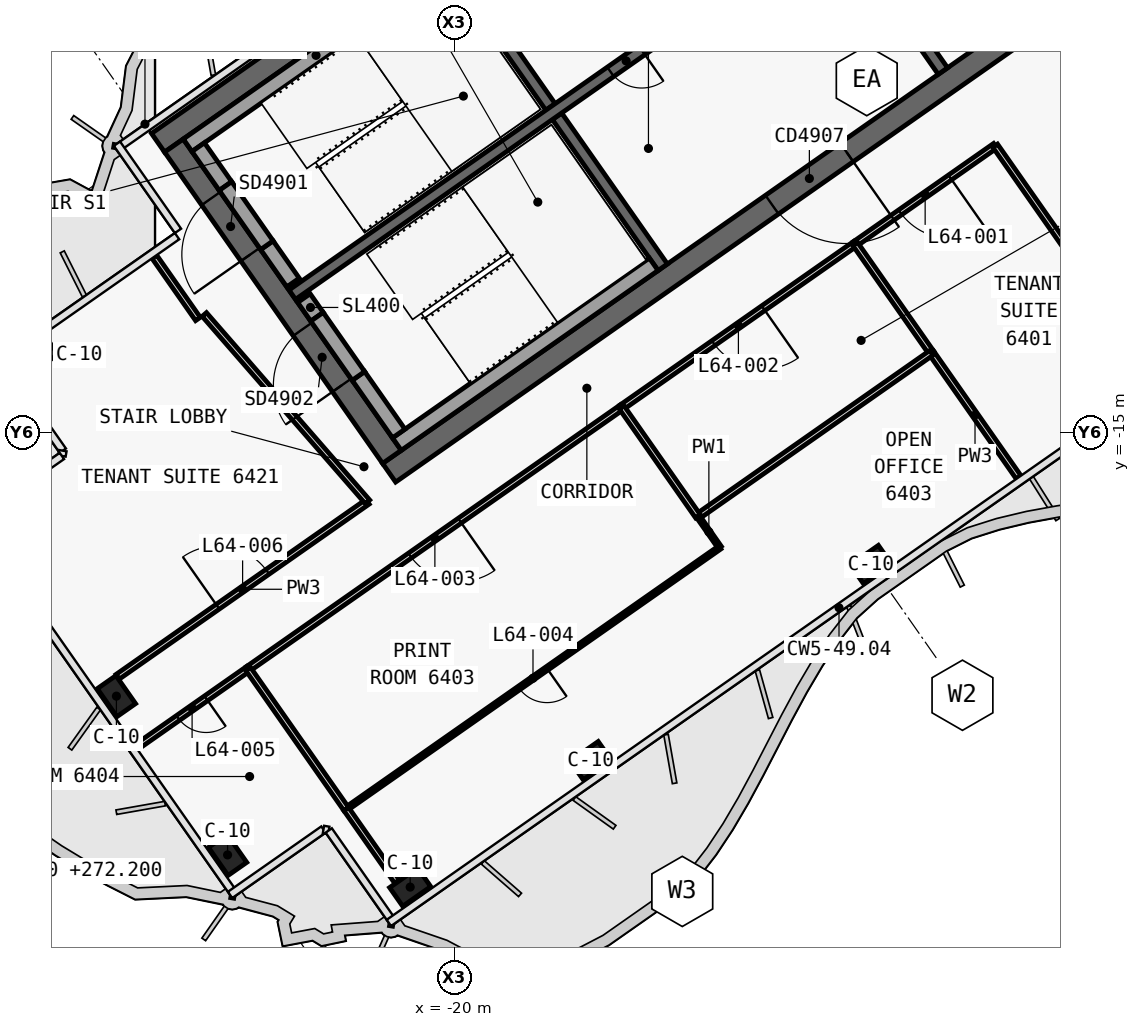
"""IFC4 building model, lengths in metres.
Left out: names, types, materials, properties, quantities, classifications, styles, units other than length and angle.
Written with IfcOpenShell. Run it as: python <this file> out.ifc"""

import sys

from ifc_helpers import new_model, si_unit, direction, frame, frame_2d, origin, origin_2d, place, context, subcontext, project, spatial, polyline, rectangle, outline, extrude, element, fill, save


model = new_model("IFC4")
c1 = context("Model", 3, precision=1e-05, world=origin(), true_north=direction((0.0, 1.0)))
c2 = subcontext(c1, "Body", "Model", "MODEL_VIEW")
j1 = project(units=[si_unit("LENGTHUNIT", "METRE"), si_unit("PLANEANGLEUNIT", "RADIAN")], contexts=[c1])
p1 = place(None, origin())
s1 = spatial("IfcSite", under=j1, at=p1, CompositionType="ELEMENT")
p2 = place(p1, origin())
s2 = spatial("IfcBuilding", under=s1, at=p2, CompositionType="ELEMENT")
p3 = place(p2, frame((0.0, 0.0, 272.2)))
s3 = spatial("IfcBuildingStorey", under=s2, at=p3, CompositionType="ELEMENT", Elevation=272.2)
p4 = place(p3, frame((-0.028, 12.066, 0.0), z_axis=(0.0, 0.0, 1.0), x_axis=(-0.819151382952, -0.573577380837, 0.0)))
e1 = element("IfcWall", 1, at=p4, inside=s3, PredefinedType="SHEAR", context=c2, shape_type="SweptSolid", body=[
    extrude(outline(polyline([(33.898, 0.3), (0.42, 0.3), (0.0, -0.3), (33.898, -0.3), (33.898, 0.3)])), origin(), (0.0, 0.0, 1.0), 3.9),
])
p5 = place(p3, frame((-0.028, -0.874, 0.0), z_axis=(0.0, 0.0, 1.0), x_axis=(-0.819150035022, -0.573579305871, 0.0)))
e2 = element("IfcWall", 2, at=p5, inside=s3, PredefinedType="SHEAR", context=c2, shape_type="SweptSolid", body=[
    extrude(outline(polyline([(26.476, 0.3), (0.42, 0.3), (0.0, -0.3), (26.476, -0.3), (26.476, 0.3)])), origin(), (0.0, 0.0, 1.0), 3.9),
])
p6 = place(p5, frame((2.976, 0.0, 0.0)))
e3 = element("IfcOpeningElement", 3, at=p6, cuts=e2, PredefinedType="OPENING", context=c2, shape_type="SweptSolid", body=[
    extrude(rectangle(XDim=2.4, YDim=2.1, at=frame_2d((1.2, 1.05))), frame((0.0, 0.31, 0.0), z_axis=(0.0, -1.0, 0.0), x_axis=(1.0, 0.0, 0.0)), (0.0, 0.0, 1.0), 0.62),
])
p7 = place(p5, frame((11.776, 0.0, 0.0)))
e4 = element("IfcOpeningElement", 4, at=p7, cuts=e2, PredefinedType="OPENING", context=c2, shape_type="SweptSolid", body=[
    extrude(rectangle(XDim=2.4, YDim=2.1, at=frame_2d((1.2, 1.05))), frame((0.0, 0.31, 0.0), z_axis=(0.0, -1.0, 0.0), x_axis=(1.0, 0.0, 0.0)), (0.0, 0.0, 1.0), 0.62),
])
p8 = place(p3, frame((-21.642, -15.642, 0.0), z_axis=(0.0, 0.0, 1.0), x_axis=(-0.573586866468, 0.819144740944, 0.0)))
e5 = element("IfcWall", 5, at=p8, inside=s3, PredefinedType="SHEAR", context=c2, shape_type="SweptSolid", body=[
    extrude(outline(polyline([(0.0, 0.3), (0.0, -0.3), (10.0, -0.3), (10.0, 0.3), (0.0, 0.3)])), origin(), (0.0, 0.0, 1.0), 3.9),
])
p9 = place(p8, frame((6.5, 0.0, 0.0)))
e6 = element("IfcOpeningElement", 6, at=p9, cuts=e5, PredefinedType="OPENING", context=c2, shape_type="SweptSolid", body=[
    extrude(rectangle(XDim=1.8, YDim=2.1, at=frame_2d((0.9, 1.05))), frame((0.0, 0.31, 0.0), z_axis=(0.0, -1.0, 0.0), x_axis=(1.0, 0.0, 0.0)), (0.0, 0.0, 1.0), 0.62),
])
p10 = place(p8, frame((2.3, 0.0, 0.0)))
e7 = element("IfcOpeningElement", 7, at=p10, cuts=e5, PredefinedType="OPENING", context=c2, shape_type="SweptSolid", body=[
    extrude(rectangle(XDim=1.8, YDim=2.1, at=frame_2d((0.9, 1.05))), frame((0.0, 0.31, 0.0), z_axis=(0.0, -1.0, 0.0), x_axis=(1.0, 0.0, 0.0)), (0.0, 0.0, 1.0), 0.62),
])
p11 = place(p3, frame((-7.143, -5.49, 0.0), z_axis=(0.0, 0.0, 1.0), x_axis=(-0.573617744349, 0.819123118565, 0.0)))
e8 = element("IfcWall", 8, at=p11, inside=s3, PredefinedType="SHEAR", context=c2, shape_type="SweptSolid", body=[
    extrude(outline(polyline([(4.85, 0.15), (0.0, 0.15), (0.0, -0.15), (4.85, -0.15), (4.85, 0.15)])), origin(), (0.0, 0.0, 1.0), 3.9),
])
p12 = place(p3, frame((-14.515, -10.652, 0.0), z_axis=(0.0, 0.0, 1.0), x_axis=(-0.573560315113, 0.819163332265, 0.0)))
e9 = element("IfcWall", 9, at=p12, inside=s3, PredefinedType="SHEAR", context=c2, shape_type="SweptSolid", body=[
    extrude(outline(polyline([(4.85, 0.15), (0.0, 0.15), (0.0, -0.15), (4.85, -0.15), (4.85, 0.15)])), origin(), (0.0, 0.0, 1.0), 3.9),
])
p13 = place(p3, frame((-17.469, -6.433, 0.0), z_axis=(0.0, 0.0, 1.0), x_axis=(-0.573594092424, 0.81913968109, 0.0)))
e10 = element("IfcWall", 10, at=p13, inside=s3, PredefinedType="SHEAR", context=c2, shape_type="SweptSolid", body=[
    extrude(outline(polyline([(4.85, -0.15), (4.85, 0.15), (0.0, 0.15), (0.0, -0.15), (4.85, -0.15)])), origin(), (0.0, 0.0, 1.0), 3.9),
])
p14 = place(p3, frame((-2.638, 3.768, 0.0), z_axis=(0.0, 0.0, 1.0), x_axis=(-0.819155014212, -0.573572194837, 0.0)))
e11 = element("IfcWall", 11, at=p14, inside=s3, PredefinedType="SHEAR", context=c2, shape_type="SweptSolid", body=[
    extrude(outline(polyline([(26.4, 0.15), (0.0, 0.15), (0.0, -0.15), (26.4, -0.15), (26.4, 0.15)])), origin(), (0.0, 0.0, 1.0), 3.9),
])
p15 = place(p14, frame((1.169, 0.0, 0.0)))
e12 = element("IfcOpeningElement", 12, at=p15, cuts=e11, PredefinedType="OPENING", context=c2, shape_type="SweptSolid", body=[
    extrude(rectangle(XDim=1.1, YDim=2.1, at=frame_2d((0.55, 1.05))), frame((0.0, 0.16, 0.0), z_axis=(0.0, -1.0, 0.0), x_axis=(1.0, 0.0, 0.0)), (0.0, 0.0, 1.0), 0.32),
])
p16 = place(p14, frame((3.206, 0.0, 0.0)))
e13 = element("IfcOpeningElement", 13, at=p16, cuts=e11, PredefinedType="OPENING", context=c2, shape_type="SweptSolid", body=[
    extrude(rectangle(XDim=1.1, YDim=2.1, at=frame_2d((0.55, 1.05))), frame((0.0, 0.16, 0.0), z_axis=(0.0, -1.0, 0.0), x_axis=(1.0, 0.0, 0.0)), (0.0, 0.0, 1.0), 0.32),
])
p17 = place(p14, frame((5.244, 0.0, 0.0)))
e14 = element("IfcOpeningElement", 14, at=p17, cuts=e11, PredefinedType="OPENING", context=c2, shape_type="SweptSolid", body=[
    extrude(rectangle(XDim=1.1, YDim=2.1, at=frame_2d((0.55, 1.05))), frame((0.0, 0.16, 0.0), z_axis=(0.0, -1.0, 0.0), x_axis=(1.0, 0.0, 0.0)), (0.0, 0.0, 1.0), 0.32),
])
p18 = place(p14, frame((7.281, 0.0, 0.0)))
e15 = element("IfcOpeningElement", 15, at=p18, cuts=e11, PredefinedType="OPENING", context=c2, shape_type="SweptSolid", body=[
    extrude(rectangle(XDim=1.1, YDim=2.1, at=frame_2d((0.55, 1.05))), frame((0.0, 0.16, 0.0), z_axis=(0.0, -1.0, 0.0), x_axis=(1.0, 0.0, 0.0)), (0.0, 0.0, 1.0), 0.32),
])
p19 = place(p14, frame((9.688, 0.0, 0.0)))
e16 = element("IfcOpeningElement", 16, at=p19, cuts=e11, PredefinedType="OPENING", context=c2, shape_type="SweptSolid", body=[
    extrude(rectangle(XDim=1.1, YDim=2.1, at=frame_2d((0.55, 1.05))), frame((0.0, 0.16, 0.0), z_axis=(0.0, -1.0, 0.0), x_axis=(1.0, 0.0, 0.0)), (0.0, 0.0, 1.0), 0.32),
])
p20 = place(p14, frame((11.863, 0.0, 0.0)))
e17 = element("IfcOpeningElement", 17, at=p20, cuts=e11, PredefinedType="OPENING", context=c2, shape_type="SweptSolid", body=[
    extrude(rectangle(XDim=1.1, YDim=2.1, at=frame_2d((0.55, 1.05))), frame((0.0, 0.16, 0.0), z_axis=(0.0, -1.0, 0.0), x_axis=(1.0, 0.0, 0.0)), (0.0, 0.0, 1.0), 0.32),
])
p21 = place(p14, frame((15.175, 0.0, 0.0)))
e18 = element("IfcOpeningElement", 18, at=p21, cuts=e11, PredefinedType="OPENING", context=c2, shape_type="SweptSolid", body=[
    extrude(rectangle(XDim=1.0, YDim=2.1, at=frame_2d((0.5, 1.05))), frame((0.0, 0.16, 0.0), z_axis=(0.0, -1.0, 0.0), x_axis=(1.0, 0.0, 0.0)), (0.0, 0.0, 1.0), 0.32),
])
for number, where, z_axis, x_axis in (
    (19, (-9.038, -18.475, 0.0), (0.0, 0.0, 1.0), (-0.819, -0.574, 0.0)),
    (20, (-16.41, -23.637, 0.0), (0.0, 0.0, 1.0), (-0.819, -0.574, 0.0)),
    (21, (-21.161, -26.964, 0.0), (0.0, 0.0, 1.0), (-0.819, -0.574, 0.0)),
    (22, (-30.969, -12.956, 0.0), (0.0, 0.0, 1.0), (-0.819, -0.574, 0.0)),
    (23, (-25.966, -26.117, 0.0), (0.0, 0.0, 1.0), (-0.574, 0.819, 0.0)),
    (24, (-28.891, -21.939, 0.0), (0.0, 0.0, 1.0), (-0.574, 0.819, 0.0)),
):
    element("IfcColumn", number, at=place(p3, frame(where, z_axis=z_axis, x_axis=x_axis)), inside=s3, PredefinedType="COLUMN", context=c2, shape_type="SweptSolid", body=[
        extrude(rectangle(XDim=0.9, YDim=0.6, at=origin_2d()), origin(), (0.0, 0.0, 1.0), 3.9),
    ])
p22 = place(p3, frame((-20.259, -2.71, 0.0), z_axis=(0.0, 0.0, 1.0), x_axis=(-0.81914849389, -0.573581506813, 0.0)))
e25 = element("IfcWall", 25, at=p22, inside=s3, PredefinedType="SOLIDWALL", context=c2, shape_type="SweptSolid", body=[
    extrude(rectangle(XDim=8.25, YDim=0.4, at=frame_2d((4.125, 0.0))), origin(), (0.0, 0.0, 1.0), 3.62),
])
p23 = place(p3, frame((-24.244, -11.055, 0.0), z_axis=(0.0, 0.0, 1.0), x_axis=(-0.573571582932, 0.819155442668, 0.0)))
e26 = element("IfcWall", 26, at=p23, inside=s3, PredefinedType="SOLIDWALL", context=c2, shape_type="SweptSolid", body=[
    extrude(rectangle(XDim=1.2, YDim=0.4, at=frame_2d((0.6, 0.0))), origin(), (0.0, 0.0, 1.0), 3.62),
])
p24 = place(p3, frame((-26.022, -8.515, 0.0), z_axis=(0.0, 0.0, 1.0), x_axis=(-0.573619628835, 0.819121798889, 0.0)))
e27 = element("IfcWall", 27, at=p24, inside=s3, PredefinedType="SOLIDWALL", context=c2, shape_type="SweptSolid", body=[
    extrude(rectangle(XDim=1.25, YDim=0.4, at=frame_2d((0.625, 0.0))), origin(), (0.0, 0.0, 1.0), 3.62),
])
p25 = place(p3, frame((-24.932, -10.072, 2.15), z_axis=(0.0, 0.0, 1.0), x_axis=(-0.573591692345, 0.819141361715, 0.0)))
e28 = element("IfcWall", 28, at=p25, inside=s3, PredefinedType="SOLIDWALL", context=c2, shape_type="SweptSolid", body=[
    extrude(rectangle(XDim=1.9, YDim=0.4, at=frame_2d((0.95, 0.0))), origin(), (0.0, 0.0, 1.0), 1.47),
])
p26 = place(p3, frame((-14.753, -10.574, 0.0), z_axis=(0.0, 0.0, 1.0), x_axis=(-0.819158229677, -0.573567602601, 0.0)))
e29 = element("IfcWall", 29, at=p26, inside=s3, PredefinedType="SOLIDWALL", context=c2, shape_type="SweptSolid", body=[
    extrude(rectangle(XDim=8.25, YDim=0.4, at=frame_2d((4.125, 0.0))), origin(), (0.0, 0.0, 1.0), 3.62),
])
p27 = place(p3, frame((-21.462, -15.028, 0.0), z_axis=(0.0, 0.0, 1.0), x_axis=(-0.573559770908, 0.819163713305, 0.0)))
e30 = element("IfcWall", 30, at=p27, inside=s3, PredefinedType="SOLIDWALL", context=c2, shape_type="SweptSolid", body=[
    extrude(rectangle(XDim=1.85, YDim=0.4, at=frame_2d((0.925, 0.0))), origin(), (0.0, 0.0, 1.0), 3.62),
])
p28 = place(p3, frame((-23.613, -11.956, 0.0), z_axis=(0.0, 0.0, 1.0), x_axis=(-0.573435029941, 0.819251039936, 0.0)))
e31 = element("IfcWall", 31, at=p28, inside=s3, PredefinedType="SOLIDWALL", context=c2, shape_type="SweptSolid", body=[
    extrude(rectangle(XDim=0.6, YDim=0.4, at=frame_2d((0.3, 0.0))), origin(), (0.0, 0.0, 1.0), 3.62),
])
p29 = place(p3, frame((-22.523, -13.512, 2.15), z_axis=(0.0, 0.0, 1.0), x_axis=(-0.573591692345, 0.819141361715, 0.0)))
e32 = element("IfcWall", 32, at=p29, inside=s3, PredefinedType="SOLIDWALL", context=c2, shape_type="SweptSolid", body=[
    extrude(rectangle(XDim=1.9, YDim=0.4, at=frame_2d((0.95, 0.0))), origin(), (0.0, 0.0, 1.0), 1.47),
])
p30 = place(p3, frame((-28.858, -21.428, 0.0), z_axis=(0.0, 0.0, 1.0), x_axis=(0.819137602434, 0.573597060905, 0.0)))
e33 = element("IfcWall", 33, at=p30, inside=s3, PredefinedType="PARTITIONING", context=c2, shape_type="SweptSolid", body=[
    extrude(rectangle(XDim=8.027, YDim=0.15, at=frame_2d((4.013, 0.0))), origin(), (0.0, 0.0, 1.0), 3.05),
])
p31 = place(p30, frame((3.213, 0.0, 0.0)))
e34 = element("IfcOpeningElement", 34, at=p31, cuts=e33, PredefinedType="OPENING", context=c2, shape_type="SweptSolid", body=[
    extrude(rectangle(XDim=1.6, YDim=2.1, at=frame_2d((0.8, 1.05))), frame((0.0, 0.085, 0.0), z_axis=(0.0, -1.0, 0.0), x_axis=(1.0, 0.0, 0.0)), (0.0, 0.0, 1.0), 0.17),
])
p32 = place(p3, frame((-5.766, -7.456, 0.0), z_axis=(0.0, 0.0, 1.0), x_axis=(-0.819142740634, -0.573589723117, 0.0)))
e35 = element("IfcWall", 35, at=p32, inside=s3, PredefinedType="PARTITIONING", context=c2, shape_type="SweptSolid", body=[
    extrude(rectangle(XDim=4.502, YDim=0.15, at=frame_2d((2.251, 0.0))), origin(), (0.0, 0.0, 1.0), 3.05),
])
p33 = place(p32, frame((1.451, 0.0, 0.0)))
e36 = element("IfcOpeningElement", 36, at=p33, cuts=e35, PredefinedType="OPENING", context=c2, shape_type="SweptSolid", body=[
    extrude(rectangle(XDim=1.6, YDim=2.1, at=frame_2d((0.8, 1.05))), frame((0.0, 0.085, 0.0), z_axis=(0.0, -1.0, 0.0), x_axis=(1.0, 0.0, 0.0)), (0.0, 0.0, 1.0), 0.17),
])
p34 = place(p3, frame((-9.451, -10.036, 0.0), z_axis=(0.0, 0.0, 1.0), x_axis=(-0.819164661457, -0.573558416746, 0.0)))
e37 = element("IfcWall", 37, at=p34, inside=s3, PredefinedType="PARTITIONING", context=c2, shape_type="SweptSolid", body=[
    extrude(rectangle(XDim=7.504, YDim=0.15, at=frame_2d((3.752, 0.0))), origin(), (0.0, 0.0, 1.0), 3.05),
])
p35 = place(p34, frame((2.952, 0.0, 0.0)))
e38 = element("IfcOpeningElement", 38, at=p35, cuts=e37, PredefinedType="OPENING", context=c2, shape_type="SweptSolid", body=[
    extrude(rectangle(XDim=1.6, YDim=2.1, at=frame_2d((0.8, 1.05))), frame((0.0, 0.085, 0.0), z_axis=(0.0, -1.0, 0.0), x_axis=(1.0, 0.0, 0.0)), (0.0, 0.0, 1.0), 0.17),
])
p36 = place(p3, frame((-15.594, -14.338, 0.0), z_axis=(0.0, 0.0, 1.0), x_axis=(-0.819154519377, -0.573572901543, 0.0)))
e39 = element("IfcWall", 39, at=p36, inside=s3, PredefinedType="PARTITIONING", context=c2, shape_type="SweptSolid", body=[
    extrude(rectangle(XDim=12.004, YDim=0.15, at=frame_2d((6.002, 0.0))), origin(), (0.0, 0.0, 1.0), 3.05),
])
p37 = place(p36, frame((5.202, 0.0, 0.0)))
e40 = element("IfcOpeningElement", 40, at=p37, cuts=e39, PredefinedType="OPENING", context=c2, shape_type="SweptSolid", body=[
    extrude(rectangle(XDim=1.6, YDim=2.1, at=frame_2d((0.8, 1.05))), frame((0.0, 0.085, 0.0), z_axis=(0.0, -1.0, 0.0), x_axis=(1.0, 0.0, 0.0)), (0.0, 0.0, 1.0), 0.17),
])
p38 = place(p3, frame((-25.424, -21.22, 0.0), z_axis=(0.0, 0.0, 1.0), x_axis=(-0.819142755392, -0.573589702042, 0.0)))
e41 = element("IfcWall", 41, at=p38, inside=s3, PredefinedType="PARTITIONING", context=c2, shape_type="SweptSolid", body=[
    extrude(rectangle(XDim=3.602, YDim=0.15, at=frame_2d((1.801, 0.0))), origin(), (0.0, 0.0, 1.0), 3.0),
])
p39 = place(p38, frame((1.351, 0.0, 0.0)))
e42 = element("IfcOpeningElement", 42, at=p39, cuts=e41, PredefinedType="OPENING", context=c2, shape_type="SweptSolid", body=[
    extrude(rectangle(XDim=0.9, YDim=2.1, at=frame_2d((0.45, 1.05))), frame((0.0, 0.085, 0.0), z_axis=(0.0, -1.0, 0.0), x_axis=(1.0, 0.0, 0.0)), (0.0, 0.0, 1.0), 0.17),
])
p40 = place(p3, frame((-1.849, -13.051, 0.0), z_axis=(0.0, 0.0, 1.0), x_axis=(-0.57357985571, 0.819149650018, 0.0)))
e43 = element("IfcWall", 43, at=p40, inside=s3, PredefinedType="PARTITIONING", context=c2, shape_type="SweptSolid", body=[
    extrude(rectangle(XDim=6.832, YDim=0.15, at=frame_2d((3.416, 0.0))), origin(), (0.0, 0.0, 1.0), 3.05),
])
p41 = place(p3, frame((-26.746, -12.014, 0.0), z_axis=(0.0, 0.0, 1.0), x_axis=(-0.573568836472, 0.819157365729, 0.0)))
e44 = element("IfcWall", 44, at=p41, inside=s3, PredefinedType="PARTITIONING", context=c2, shape_type="SweptSolid", body=[
    extrude(rectangle(XDim=2.0, YDim=0.15, at=frame_2d((1.0, 0.0))), origin(), (0.0, 0.0, 1.0), 3.05),
])
p42 = place(p3, frame((-22.284, -16.826, 0.0), z_axis=(0.0, 0.0, 1.0), x_axis=(-0.656758142177, 0.754101281449, 0.0)))
e45 = element("IfcWall", 45, at=p42, inside=s3, PredefinedType="PARTITIONING", context=c2, shape_type="SweptSolid", body=[
    extrude(rectangle(XDim=6.539, YDim=0.15, at=frame_2d((3.269, 0.0))), origin(), (0.0, 0.0, 1.0), 3.62),
])
p43 = place(p3, frame((-7.444, -12.906, 0.0), z_axis=(0.0, 0.0, 1.0), x_axis=(-0.573555919535, 0.819166409935, 0.0)))
e46 = element("IfcWall", 46, at=p43, inside=s3, PredefinedType="PARTITIONING", context=c2, shape_type="SweptSolid", body=[
    extrude(rectangle(XDim=3.502, YDim=0.15, at=frame_2d((1.751, 0.0))), origin(), (0.0, 0.0, 1.0), 3.62),
])
p44 = place(p3, frame((-5.151, -16.18, 0.0), z_axis=(0.0, 0.0, 1.0), x_axis=(-0.573593387921, 0.81914017441, 0.0)))
e47 = element("IfcWall", 47, at=p44, inside=s3, PredefinedType="PARTITIONING", context=c2, shape_type="SweptSolid", body=[
    extrude(rectangle(XDim=4.001, YDim=0.15, at=frame_2d((2.0, 0.0))), origin(), (0.0, 0.0, 1.0), 3.0),
])
p45 = place(p3, frame((-7.445, -12.904, 0.0), z_axis=(0.0, 0.0, 1.0), x_axis=(-0.819137093595, -0.573597787563, 0.0)))
e48 = element("IfcWall", 48, at=p45, inside=s3, PredefinedType="PARTITIONING", context=c2, shape_type="SweptSolid", body=[
    extrude(rectangle(XDim=7.5, YDim=0.15, at=frame_2d((3.75, 0.0))), origin(), (0.0, 0.0, 1.0), 3.05),
])
p46 = place(p3, frame((-13.589, -17.206, 0.0), z_axis=(0.0, 0.0, 1.0), x_axis=(-0.573565328398, 0.819159822049, 0.0)))
e49 = element("IfcWall", 49, at=p46, inside=s3, PredefinedType="PARTITIONING", context=c2, shape_type="SweptSolid", body=[
    extrude(rectangle(XDim=3.5, YDim=0.15, at=frame_2d((1.75, 0.0))), origin(), (0.0, 0.0, 1.0), 3.62),
])
p47 = place(p3, frame((-13.588, -17.207, 0.0), z_axis=(0.0, 0.0, 1.0), x_axis=(0.573708088123, -0.819059844958, 0.0)))
e50 = element("IfcWall", 50, at=p47, inside=s3, PredefinedType="PARTITIONING", context=c2, shape_type="SweptSolid", body=[
    extrude(rectangle(XDim=1.0, YDim=0.1, at=frame_2d((0.5, 0.0))), origin(), (0.0, 0.0, 1.0), 3.62),
])
p48 = place(p3, frame((-13.014, -18.026, 0.0), z_axis=(0.0, 0.0, 1.0), x_axis=(-0.819146845232, -0.573583861302, 0.0)))
e51 = element("IfcWall", 51, at=p48, inside=s3, PredefinedType="PARTITIONING", context=c2, shape_type="SweptSolid", body=[
    extrude(rectangle(XDim=12.0, YDim=0.1, at=frame_2d((6.0, 0.0))), origin(), (0.0, 0.0, 1.0), 3.05),
])
p49 = place(p48, frame((5.55, 0.0, 0.0)))
e52 = element("IfcOpeningElement", 52, at=p49, cuts=e51, PredefinedType="OPENING", context=c2, shape_type="SweptSolid", body=[
    extrude(rectangle(XDim=0.9, YDim=2.1, at=frame_2d((0.45, 1.05))), frame((0.0, 0.06, 0.0), z_axis=(0.0, -1.0, 0.0), x_axis=(1.0, 0.0, 0.0)), (0.0, 0.0, 1.0), 0.12),
])
p50 = place(p3, frame((-21.509, -26.816, 0.0), z_axis=(0.0, 0.0, 1.0), x_axis=(-0.573546771379, 0.819172815126, 0.0)))
e53 = element("IfcWall", 53, at=p50, inside=s3, PredefinedType="PARTITIONING", context=c2, shape_type="SweptSolid", body=[
    extrude(rectangle(XDim=2.329, YDim=0.15, at=frame_2d((1.165, 0.0))), origin(), (0.0, 0.0, 1.0), 3.0),
])
p51 = place(p3, frame((-22.845, -24.908, 0.0), z_axis=(0.0, 0.0, 1.0), x_axis=(-0.573586141663, 0.819145248471, 0.0)))
e54 = element("IfcWall", 54, at=p51, inside=s3, PredefinedType="PARTITIONING", context=c2, shape_type="SweptSolid", body=[
    extrude(rectangle(XDim=4.5, YDim=0.15, at=frame_2d((2.25, 0.0))), origin(), (0.0, 0.0, 1.0), 3.05),
])
p52 = place(p21, origin())
e55 = element("IfcDoor", 55, at=p52, inside=s3, OperationType="SINGLE_SWING_RIGHT", PredefinedType="DOOR", context=c2, shape_type="SweptSolid", body=[
    extrude(rectangle(XDim=1.0, YDim=2.1, at=frame_2d((0.5, 1.05))), frame((0.0, 0.025, 0.0), z_axis=(0.0, -1.0, 0.0), x_axis=(1.0, 0.0, 0.0)), (0.0, 0.0, 1.0), 0.05),
])
fill(e18, e55)
p53 = place(p7, origin())
e56 = element("IfcDoor", 56, at=p53, inside=s3, OperationType="DOUBLE_DOOR_SINGLE_SWING", PredefinedType="DOOR", context=c2, shape_type="SweptSolid", body=[
    extrude(rectangle(XDim=2.4, YDim=2.1, at=frame_2d((1.2, 1.05))), frame((0.0, 0.025, 0.0), z_axis=(0.0, -1.0, 0.0), x_axis=(1.0, 0.0, 0.0)), (0.0, 0.0, 1.0), 0.05),
])
fill(e4, e56)
p54 = place(p9, origin())
e57 = element("IfcDoor", 57, at=p54, inside=s3, OperationType="DOUBLE_DOOR_SINGLE_SWING", PredefinedType="DOOR", context=c2, shape_type="SweptSolid", body=[
    extrude(rectangle(XDim=1.8, YDim=2.1, at=frame_2d((0.9, 1.05))), frame((0.0, 0.025, 0.0), z_axis=(0.0, -1.0, 0.0), x_axis=(1.0, 0.0, 0.0)), (0.0, 0.0, 1.0), 0.05),
])
fill(e6, e57)
p55 = place(p10, origin())
e58 = element("IfcDoor", 58, at=p55, inside=s3, OperationType="DOUBLE_DOOR_SINGLE_SWING", PredefinedType="DOOR", context=c2, shape_type="SweptSolid", body=[
    extrude(rectangle(XDim=1.8, YDim=2.1, at=frame_2d((0.9, 1.05))), frame((0.0, 0.025, 0.0), z_axis=(0.0, -1.0, 0.0), x_axis=(1.0, 0.0, 0.0)), (0.0, 0.0, 1.0), 0.05),
])
fill(e7, e58)
p56 = place(p33, origin())
e59 = element("IfcDoor", 59, at=p56, inside=s3, OperationType="DOUBLE_DOOR_SINGLE_SWING", PredefinedType="DOOR", context=c2, shape_type="SweptSolid", body=[
    extrude(rectangle(XDim=1.6, YDim=2.1, at=frame_2d((0.8, 1.05))), frame((0.0, 0.025, 0.0), z_axis=(0.0, -1.0, 0.0), x_axis=(1.0, 0.0, 0.0)), (0.0, 0.0, 1.0), 0.05),
])
fill(e36, e59)
p57 = place(p35, origin())
e60 = element("IfcDoor", 60, at=p57, inside=s3, OperationType="DOUBLE_DOOR_SINGLE_SWING", PredefinedType="DOOR", context=c2, shape_type="SweptSolid", body=[
    extrude(rectangle(XDim=1.6, YDim=2.1, at=frame_2d((0.8, 1.05))), frame((0.0, 0.025, 0.0), z_axis=(0.0, -1.0, 0.0), x_axis=(1.0, 0.0, 0.0)), (0.0, 0.0, 1.0), 0.05),
])
fill(e38, e60)
p58 = place(p37, origin())
e61 = element("IfcDoor", 61, at=p58, inside=s3, OperationType="DOUBLE_DOOR_SINGLE_SWING", PredefinedType="DOOR", context=c2, shape_type="SweptSolid", body=[
    extrude(rectangle(XDim=1.6, YDim=2.1, at=frame_2d((0.8, 1.05))), frame((0.0, 0.025, 0.0), z_axis=(0.0, -1.0, 0.0), x_axis=(1.0, 0.0, 0.0)), (0.0, 0.0, 1.0), 0.05),
])
fill(e40, e61)
p59 = place(p49, origin())
e62 = element("IfcDoor", 62, at=p59, inside=s3, OperationType="SINGLE_SWING_RIGHT", PredefinedType="DOOR", context=c2, shape_type="SweptSolid", body=[
    extrude(rectangle(XDim=0.9, YDim=2.1, at=frame_2d((0.45, 1.05))), frame((0.0, 0.025, 0.0), z_axis=(0.0, -1.0, 0.0), x_axis=(1.0, 0.0, 0.0)), (0.0, 0.0, 1.0), 0.05),
])
fill(e52, e62)
p60 = place(p39, origin())
e63 = element("IfcDoor", 63, at=p60, inside=s3, OperationType="SINGLE_SWING_LEFT", PredefinedType="DOOR", context=c2, shape_type="SweptSolid", body=[
    extrude(rectangle(XDim=0.9, YDim=2.1, at=frame_2d((0.45, 1.05))), frame((0.0, 0.025, 0.0), z_axis=(0.0, -1.0, 0.0), x_axis=(1.0, 0.0, 0.0)), (0.0, 0.0, 1.0), 0.05),
])
fill(e42, e63)
p61 = place(p31, origin())
e64 = element("IfcDoor", 64, at=p61, inside=s3, OperationType="DOUBLE_DOOR_SINGLE_SWING", PredefinedType="DOOR", context=c2, shape_type="SweptSolid", body=[
    extrude(rectangle(XDim=1.6, YDim=2.1, at=frame_2d((0.8, 1.05))), frame((0.0, 0.025, 0.0), z_axis=(0.0, -1.0, 0.0), x_axis=(1.0, 0.0, 0.0)), (0.0, 0.0, 1.0), 0.05),
])
fill(e34, e64)
save(model, sys.argv[1])
